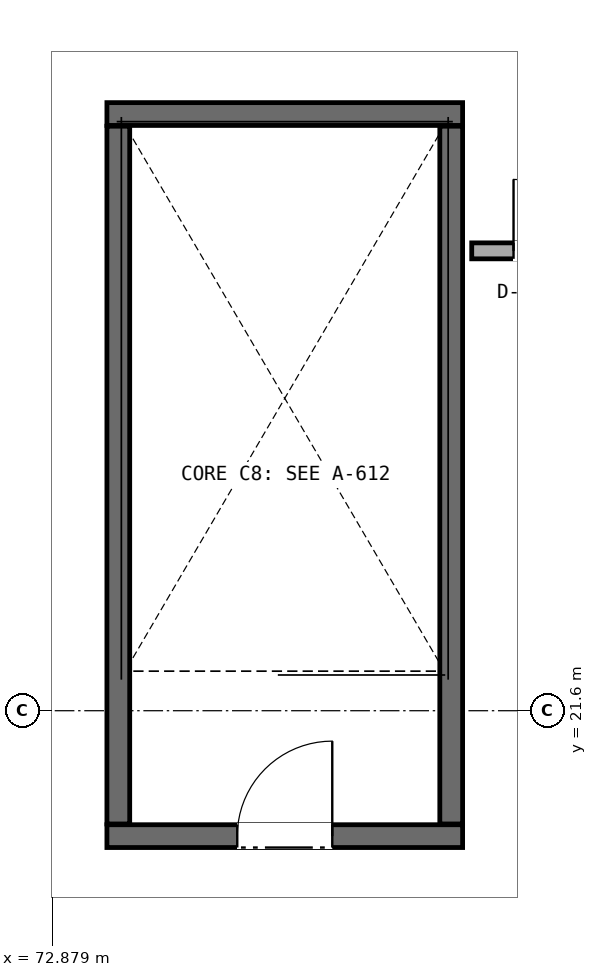
"""IFC4 building model, lengths in metres.
Left out: names, types, materials, properties, quantities, classifications, styles, units other than length and angle.
Written with IfcOpenShell. Run it as: python <this file> out.ifc"""

import sys

from ifc_helpers import new_model, si_unit, direction, frame, frame_2d, origin, place, context, subcontext, project, spatial, rectangle, extrude, element, fill, save


model = new_model("IFC4")
c1 = context("Model", 3, precision=1e-05, world=origin(), true_north=direction((0.0, 1.0)))
c2 = subcontext(c1, "Body", "Model", "MODEL_VIEW")
j1 = project(units=[si_unit("LENGTHUNIT", "METRE"), si_unit("PLANEANGLEUNIT", "RADIAN")], contexts=[c1])
p1 = place(None, origin())
s1 = spatial("IfcSite", under=j1, at=p1, CompositionType="ELEMENT")
p2 = place(p1, origin())
s2 = spatial("IfcBuilding", under=s1, at=p2, CompositionType="ELEMENT")
p3 = place(p2, frame((0.0, 0.0, 5.6)))
s3 = spatial("IfcBuildingStorey", under=s2, at=p3, CompositionType="ELEMENT", Elevation=5.6)
p4 = place(p3, frame((73.6, 19.95, 0.0), z_axis=(0.0, 0.0, 1.0), x_axis=(1.0, 0.0, 0.0)))
e1 = element("IfcWall", 1, at=p4, inside=s3, PredefinedType="SHEAR", context=c2, shape_type="SweptSolid", body=[
    extrude(rectangle(XDim=4.68, YDim=0.3, at=frame_2d((2.34, 0.0))), origin(), (0.0, 0.0, 1.0), 4.245),
])
p5 = place(p4, frame((1.715, 0.0, 0.0)))
e2 = element("IfcOpeningElement", 2, at=p5, cuts=e1, PredefinedType="OPENING", context=c2, shape_type="SweptSolid", body=[
    extrude(rectangle(XDim=1.25, YDim=2.2, at=frame_2d((0.625, 1.1))), frame((0.0, 0.16, 0.0), z_axis=(0.0, -1.0, 0.0), x_axis=(1.0, 0.0, 0.0)), (0.0, 0.0, 1.0), 0.32),
])
p6 = place(p3, frame((78.28, 29.45, 0.0), z_axis=(0.0, 0.0, 1.0), x_axis=(-1.0, 0.0, 0.0)))
e3 = element("IfcWall", 3, at=p6, inside=s3, PredefinedType="SHEAR", context=c2, shape_type="SweptSolid", body=[
    extrude(rectangle(XDim=4.68, YDim=0.3, at=frame_2d((2.34, 0.0))), origin(), (0.0, 0.0, 1.0), 4.245),
])
for number, where, z_axis, x_axis in (
    (4, (78.13, 20.11, 0.0), (0.0, 0.0, 1.0), (0.0, 1.0, 0.0)),
    (5, (73.75, 29.29, 0.0), (0.0, 0.0, 1.0), (0.0, -1.0, 0.0)),
):
    element("IfcWall", number, at=place(p3, frame(where, z_axis=z_axis, x_axis=x_axis)), inside=s3, PredefinedType="SHEAR", context=c2, shape_type="SweptSolid", body=[
        extrude(rectangle(XDim=9.18, YDim=0.3, at=frame_2d((4.59, 0.0))), origin(), (0.0, 0.0, 1.0), 4.245),
    ])
p7 = place(p3, frame((80.44, 27.65, 0.0), z_axis=(0.0, 0.0, 1.0), x_axis=(-1.0, 0.0, 0.0)))
e6 = element("IfcWall", 6, at=p7, inside=s3, PredefinedType="PARTITIONING", context=c2, shape_type="SweptSolid", body=[
    extrude(rectangle(XDim=2.04, YDim=0.21, at=frame_2d((1.02, 0.0))), origin(), (0.0, 0.0, 1.0), 4.13),
])
p8 = place(p7, frame((0.55, 0.0, 0.0)))
e7 = element("IfcOpeningElement", 7, at=p8, cuts=e6, PredefinedType="OPENING", context=c2, shape_type="SweptSolid", body=[
    extrude(rectangle(XDim=0.94, YDim=2.08, at=frame_2d((0.47, 1.04))), frame((0.0, 0.115, 0.0), z_axis=(0.0, -1.0, 0.0), x_axis=(1.0, 0.0, 0.0)), (0.0, 0.0, 1.0), 0.23),
])
p9 = place(p5, origin())
e8 = element("IfcDoor", 8, at=p9, inside=s3, OperationType="SINGLE_SWING_RIGHT", PredefinedType="DOOR", context=c2, shape_type="SweptSolid", body=[
    extrude(rectangle(XDim=1.25, YDim=2.2, at=frame_2d((0.625, 1.1))), frame((0.0, 0.025, 0.0), z_axis=(0.0, -1.0, 0.0), x_axis=(1.0, 0.0, 0.0)), (0.0, 0.0, 1.0), 0.05),
])
fill(e2, e8)
p10 = place(p8, frame((0.94, 0.0, 0.0), z_axis=(0.0, 0.0, 1.0), x_axis=(-1.0, 0.0, 0.0)))
e9 = element("IfcDoor", 9, at=p10, inside=s3, OperationType="SINGLE_SWING_RIGHT", PredefinedType="DOOR", context=c2, shape_type="SweptSolid", body=[
    extrude(rectangle(XDim=0.94, YDim=2.08, at=frame_2d((0.47, 1.04))), frame((0.0, 0.025, 0.0), z_axis=(0.0, -1.0, 0.0), x_axis=(1.0, 0.0, 0.0)), (0.0, 0.0, 1.0), 0.05),
])
fill(e7, e9)
save(model, sys.argv[1])
